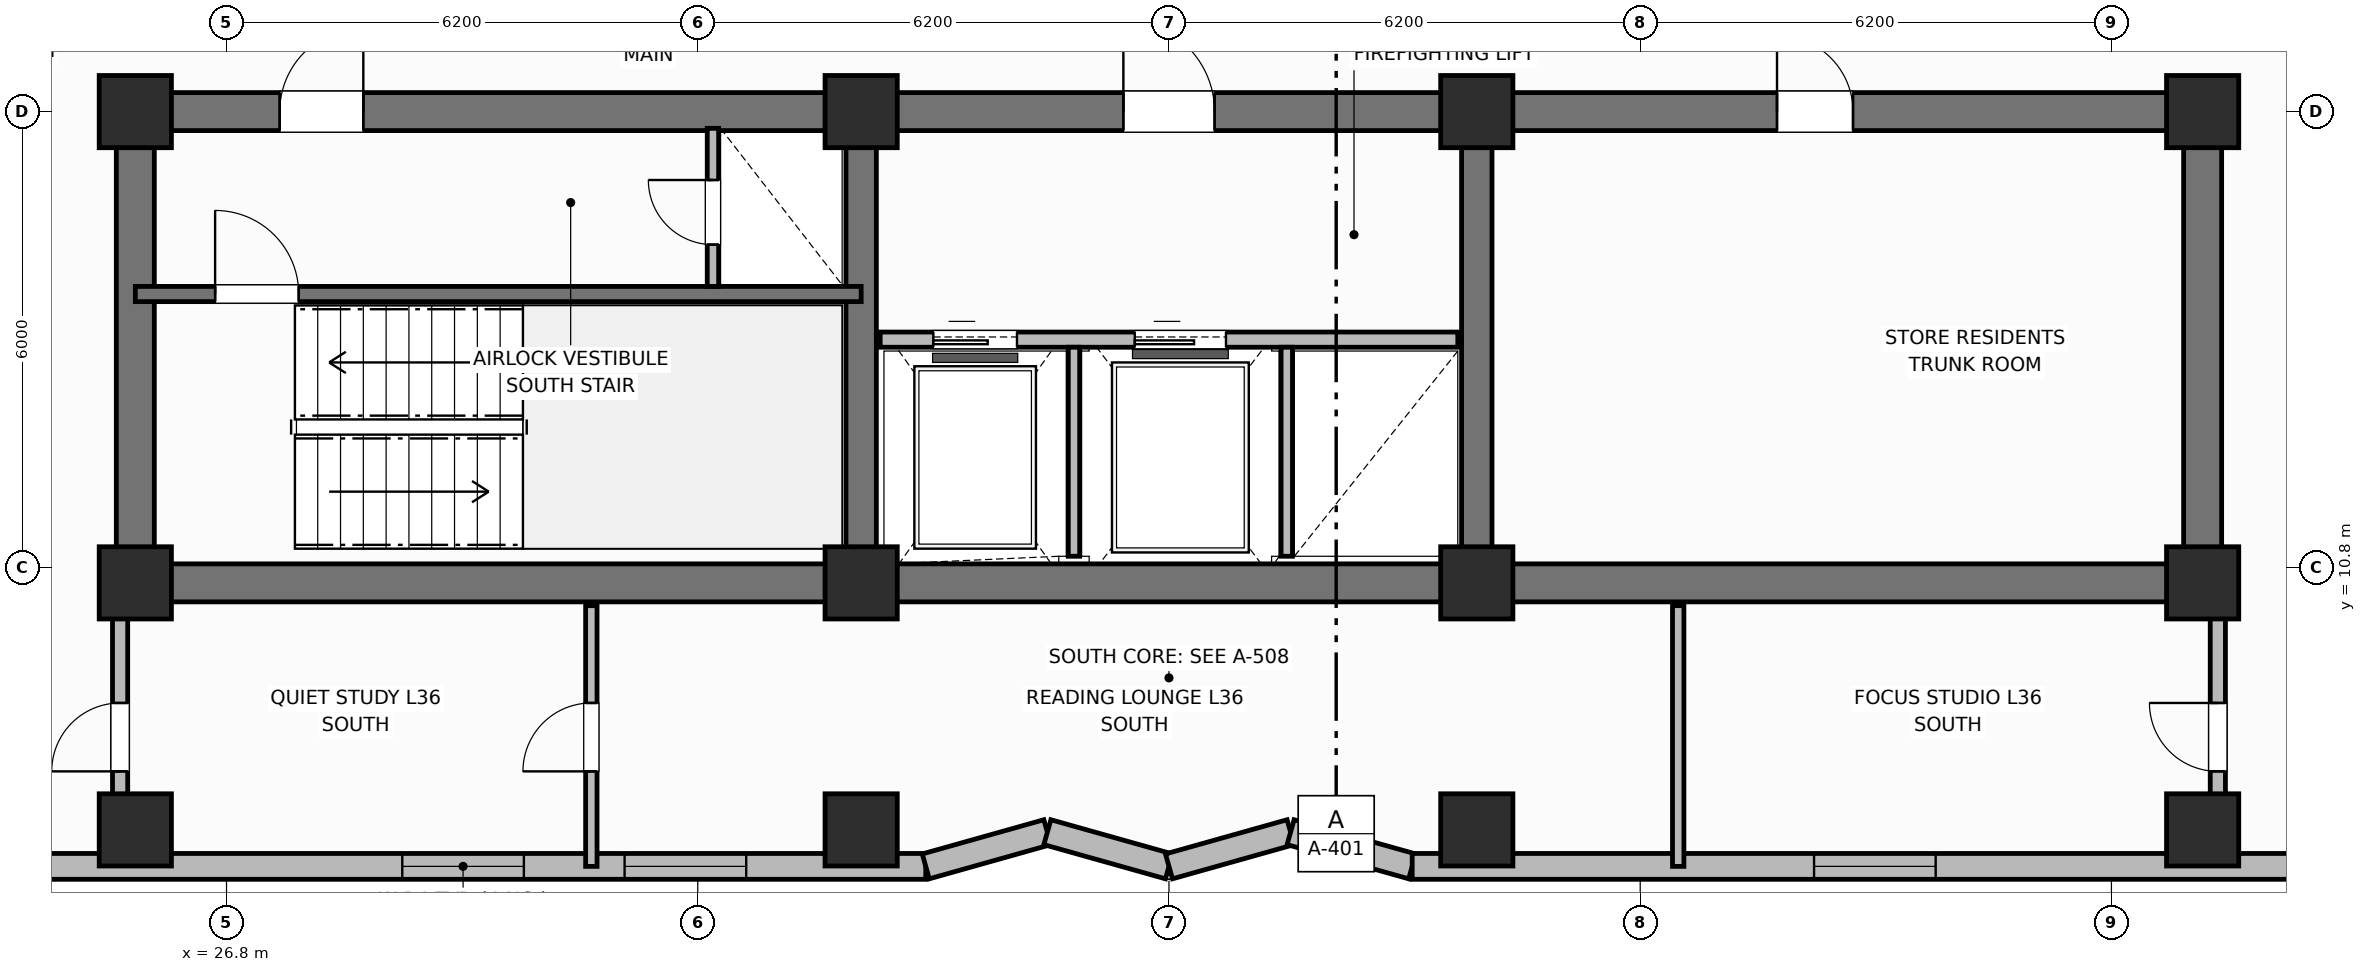
"""IFC4 building model, lengths in metres.
Left out: names, types, materials, properties, quantities, classifications, styles, units other than length and angle.
Written with IfcOpenShell. Run it as: python <this file> out.ifc"""

import sys

from ifc_helpers import new_model, si_unit, direction, frame, frame_2d, origin, origin_2d, place, context, subcontext, project, spatial, rectangle, extrude, element, fill, save


model = new_model("IFC4")
c1 = context("Model", 3, precision=1e-05, world=origin(), true_north=direction((0.0, 1.0)))
c2 = subcontext(c1, "Body", "Model", "MODEL_VIEW")
j1 = project(units=[si_unit("LENGTHUNIT", "METRE"), si_unit("PLANEANGLEUNIT", "RADIAN")], contexts=[c1])
p1 = place(None, origin())
s1 = spatial("IfcSite", under=j1, at=p1, CompositionType="ELEMENT")
p2 = place(p1, origin())
s2 = spatial("IfcBuilding", under=s1, at=p2, CompositionType="ELEMENT")
p3 = place(p2, frame((0.0, 0.0, 147.8)))
s3 = spatial("IfcBuildingStorey", under=s2, at=p3, CompositionType="ELEMENT", Elevation=147.8)
p4 = place(p3, frame((52.8, 10.6, 0.0), z_axis=(0.0, 0.0, 1.0), x_axis=(-1.0, 0.0, 0.0)))
e1 = element("IfcWall", 1, at=p4, inside=s3, PredefinedType="SHEAR", context=c2, shape_type="SweptSolid", body=[
    extrude(rectangle(XDim=27.2, YDim=0.5, at=frame_2d((13.6, 0.0))), origin(), (0.0, 0.0, 1.0), 3.7),
])
for number, where, z_axis, x_axis in (
    (2, (25.6, 10.85, 0.0), (0.0, 0.0, 1.0), (0.0, 1.0, 0.0)),
    (3, (52.8, 10.85, 0.0), (0.0, 0.0, 1.0), (0.0, 1.0, 0.0)),
):
    element("IfcWall", number, at=place(p3, frame(where, z_axis=z_axis, x_axis=x_axis)), inside=s3, PredefinedType="SHEAR", context=c2, shape_type="SweptSolid", body=[
        extrude(rectangle(XDim=5.7, YDim=0.5, at=frame_2d((2.85, 0.0))), origin(), (0.0, 0.0, 1.0), 3.7),
    ])
p5 = place(p3, frame((25.6, 16.8, 0.0), z_axis=(0.0, 0.0, 1.0), x_axis=(1.0, 0.0, 0.0)))
e4 = element("IfcWall", 4, at=p5, inside=s3, PredefinedType="SHEAR", context=c2, shape_type="SweptSolid", body=[
    extrude(rectangle(XDim=27.2, YDim=0.5, at=frame_2d((13.6, 0.0))), origin(), (0.0, 0.0, 1.0), 3.7),
])
p6 = place(p5, frame((1.9, 0.0, 0.0)))
e5 = element("IfcOpeningElement", 5, at=p6, cuts=e4, PredefinedType="OPENING", context=c2, shape_type="SweptSolid", body=[
    extrude(rectangle(XDim=1.1, YDim=2.15, at=frame_2d((0.55, 1.075))), frame((0.0, 0.26, 0.0), z_axis=(0.0, -1.0, 0.0), x_axis=(1.0, 0.0, 0.0)), (0.0, 0.0, 1.0), 0.52),
])
p7 = place(p5, frame((13.0, 0.0, 0.0)))
e6 = element("IfcOpeningElement", 6, at=p7, cuts=e4, PredefinedType="OPENING", context=c2, shape_type="SweptSolid", body=[
    extrude(rectangle(XDim=1.2, YDim=2.15, at=frame_2d((0.6, 1.075))), frame((0.0, 0.26, 0.0), z_axis=(0.0, -1.0, 0.0), x_axis=(1.0, 0.0, 0.0)), (0.0, 0.0, 1.0), 0.52),
])
p8 = place(p5, frame((21.6, 0.0, 0.0)))
e7 = element("IfcOpeningElement", 7, at=p8, cuts=e4, PredefinedType="OPENING", context=c2, shape_type="SweptSolid", body=[
    extrude(rectangle(XDim=1.0, YDim=2.15, at=frame_2d((0.5, 1.075))), frame((0.0, 0.26, 0.0), z_axis=(0.0, -1.0, 0.0), x_axis=(1.0, 0.0, 0.0)), (0.0, 0.0, 1.0), 0.52),
])
for number, where, z_axis, x_axis in (
    (8, (35.15, 10.85, 0.0), (0.0, 0.0, 1.0), (0.0, 1.0, 0.0)),
    (9, (43.25, 10.85, 0.0), (0.0, 0.0, 1.0), (0.0, 1.0, 0.0)),
):
    element("IfcWall", number, at=place(p3, frame(where, z_axis=z_axis, x_axis=x_axis)), inside=s3, PredefinedType="SHEAR", context=c2, shape_type="SweptSolid", body=[
        extrude(rectangle(XDim=5.7, YDim=0.4, at=frame_2d((2.85, 0.0))), origin(), (0.0, 0.0, 1.0), 3.7),
    ])
for number, where, z_axis, x_axis in (
    (10, (25.6, 10.6, 0.0), (0.0, 0.0, 1.0), (1.0, 0.0, 0.0)),
    (11, (25.6, 16.8, 0.0), (0.0, 0.0, 1.0), (1.0, 0.0, 0.0)),
    (12, (35.15, 10.6, 0.0), (0.0, 0.0, 1.0), (1.0, 0.0, 0.0)),
    (13, (35.15, 16.8, 0.0), (0.0, 0.0, 1.0), (1.0, 0.0, 0.0)),
    (14, (43.25, 10.6, 0.0), (0.0, 0.0, 1.0), (1.0, 0.0, 0.0)),
    (15, (43.25, 16.8, 0.0), (0.0, 0.0, 1.0), (1.0, 0.0, 0.0)),
    (16, (52.8, 10.6, 0.0), (0.0, 0.0, 1.0), (1.0, 0.0, 0.0)),
    (17, (52.8, 16.8, 0.0), (0.0, 0.0, 1.0), (1.0, 0.0, 0.0)),
    (18, (25.6, 7.35, 0.0), (0.0, 0.0, 1.0), (1.0, 0.0, 0.0)),
    (19, (35.15, 7.35, 0.0), (0.0, 0.0, 1.0), (1.0, 0.0, 0.0)),
    (20, (43.25, 7.35, 0.0), (0.0, 0.0, 1.0), (1.0, 0.0, 0.0)),
    (21, (52.8, 7.35, 0.0), (0.0, 0.0, 1.0), (1.0, 0.0, 0.0)),
):
    element("IfcColumn", number, at=place(p3, frame(where, z_axis=z_axis, x_axis=x_axis)), inside=s3, PredefinedType="COLUMN", context=c2, shape_type="SweptSolid", body=[
        extrude(rectangle(XDim=0.95, YDim=0.95, at=origin_2d()), origin(), (0.0, 0.0, 1.0), 3.7),
    ])
p9 = place(p3, frame((20.2, 6.87, 0.0), z_axis=(0.0, 0.0, 1.0), x_axis=(1.0, 0.0, 0.0)))
e22 = element("IfcWall", 22, at=p9, inside=s3, PredefinedType="SOLIDWALL", context=c2, shape_type="SweptSolid", body=[
    extrude(rectangle(XDim=15.8, YDim=0.34, at=frame_2d((7.9, 0.0))), origin(), (0.0, 0.0, 1.0), 2.72),
])
p10 = place(p9, frame((8.913, 0.0, 0.7)))
e23 = element("IfcOpeningElement", 23, at=p10, cuts=e22, PredefinedType="OPENING", context=c2, shape_type="SweptSolid", body=[
    extrude(rectangle(XDim=1.6, YDim=1.9, at=frame_2d((0.8, 0.95))), frame((0.0, 0.18, 0.0), z_axis=(0.0, -1.0, 0.0), x_axis=(1.0, 0.0, 0.0)), (0.0, 0.0, 1.0), 0.36),
])
p11 = place(p9, frame((11.837, 0.0, 0.7)))
e24 = element("IfcOpeningElement", 24, at=p11, cuts=e22, PredefinedType="OPENING", context=c2, shape_type="SweptSolid", body=[
    extrude(rectangle(XDim=1.6, YDim=1.9, at=frame_2d((0.8, 0.95))), frame((0.0, 0.18, 0.0), z_axis=(0.0, -1.0, 0.0), x_axis=(1.0, 0.0, 0.0)), (0.0, 0.0, 1.0), 0.36),
])
p12 = place(p3, frame((36.0, 6.87, 0.0), z_axis=(0.0, 0.0, 1.0), x_axis=(0.962662902433, 0.270703040766, 0.0)))
e25 = element("IfcWall", 25, at=p12, inside=s3, PredefinedType="SOLIDWALL", context=c2, shape_type="SweptSolid", body=[
    extrude(rectangle(XDim=1.662, YDim=0.34, at=frame_2d((0.831, 0.0))), origin(), (0.0, 0.0, 1.0), 2.72),
])
p13 = place(p3, frame((37.6, 7.32, 0.0), z_axis=(0.0, 0.0, 1.0), x_axis=(0.962652136636, -0.270741322725, 0.0)))
e26 = element("IfcWall", 26, at=p13, inside=s3, PredefinedType="SOLIDWALL", context=c2, shape_type="SweptSolid", body=[
    extrude(rectangle(XDim=1.662, YDim=0.34, at=frame_2d((0.831, 0.0))), origin(), (0.0, 0.0, 1.0), 2.72),
])
p14 = place(p3, frame((39.2, 6.87, 0.0), z_axis=(0.0, 0.0, 1.0), x_axis=(0.962662902433, 0.270703040766, 0.0)))
e27 = element("IfcWall", 27, at=p14, inside=s3, PredefinedType="SOLIDWALL", context=c2, shape_type="SweptSolid", body=[
    extrude(rectangle(XDim=1.662, YDim=0.34, at=frame_2d((0.831, 0.0))), origin(), (0.0, 0.0, 1.0), 2.72),
])
p15 = place(p3, frame((40.8, 7.32, 0.0), z_axis=(0.0, 0.0, 1.0), x_axis=(0.962652136636, -0.270741322725, 0.0)))
e28 = element("IfcWall", 28, at=p15, inside=s3, PredefinedType="SOLIDWALL", context=c2, shape_type="SweptSolid", body=[
    extrude(rectangle(XDim=1.662, YDim=0.34, at=frame_2d((0.831, 0.0))), origin(), (0.0, 0.0, 1.0), 2.72),
])
p16 = place(p3, frame((42.4, 6.87, 0.0), z_axis=(0.0, 0.0, 1.0), x_axis=(1.0, 0.0, 0.0)))
e29 = element("IfcWall", 29, at=p16, inside=s3, PredefinedType="SOLIDWALL", context=c2, shape_type="SweptSolid", body=[
    extrude(rectangle(XDim=15.8, YDim=0.34, at=frame_2d((7.9, 0.0))), origin(), (0.0, 0.0, 1.0), 2.72),
])
p17 = place(p16, frame((5.288, 0.0, 0.7)))
e30 = element("IfcOpeningElement", 30, at=p17, cuts=e29, PredefinedType="OPENING", context=c2, shape_type="SweptSolid", body=[
    extrude(rectangle(XDim=1.6, YDim=1.9, at=frame_2d((0.8, 0.95))), frame((0.0, 0.18, 0.0), z_axis=(0.0, -1.0, 0.0), x_axis=(1.0, 0.0, 0.0)), (0.0, 0.0, 1.0), 0.36),
])
p18 = place(p3, frame((25.6, 14.4, 0.0), z_axis=(0.0, 0.0, 1.0), x_axis=(1.0, 0.0, 0.0)))
e31 = element("IfcWall", 31, at=p18, inside=s3, PredefinedType="SHEAR", context=c2, shape_type="SweptSolid", body=[
    extrude(rectangle(XDim=9.55, YDim=0.2, at=frame_2d((4.775, 0.0))), origin(), (0.0, 0.0, 1.0), 3.7),
])
p19 = place(p18, frame((1.05, 0.0, 0.0)))
e32 = element("IfcOpeningElement", 32, at=p19, cuts=e31, PredefinedType="OPENING", context=c2, shape_type="SweptSolid", body=[
    extrude(rectangle(XDim=1.1, YDim=2.15, at=frame_2d((0.55, 1.075))), frame((0.0, 0.11, 0.0), z_axis=(0.0, -1.0, 0.0), x_axis=(1.0, 0.0, 0.0)), (0.0, 0.0, 1.0), 0.22),
])
p20 = place(p3, frame((33.2, 14.5, 0.0), z_axis=(0.0, 0.0, 1.0), x_axis=(0.0, 1.0, 0.0)))
e33 = element("IfcWall", 33, at=p20, inside=s3, PredefinedType="PARTITIONING", context=c2, shape_type="SweptSolid", body=[
    extrude(rectangle(XDim=2.08, YDim=0.15, at=frame_2d((1.04, 0.0))), origin(), (0.0, 0.0, 1.0), 2.55),
])
p21 = place(p20, frame((0.55, 0.0, 0.0)))
e34 = element("IfcOpeningElement", 34, at=p21, cuts=e33, PredefinedType="OPENING", context=c2, shape_type="SweptSolid", body=[
    extrude(rectangle(XDim=0.85, YDim=2.05, at=frame_2d((0.425, 1.025))), frame((0.0, 0.085, 0.0), z_axis=(0.0, -1.0, 0.0), x_axis=(1.0, 0.0, 0.0)), (0.0, 0.0, 1.0), 0.17),
])
p22 = place(p3, frame((35.4, 13.8, 0.0), z_axis=(0.0, 0.0, 1.0), x_axis=(1.0, 0.0, 0.0)))
e35 = element("IfcWall", 35, at=p22, inside=s3, PredefinedType="PARTITIONING", context=c2, shape_type="SweptSolid", body=[
    extrude(rectangle(XDim=7.6, YDim=0.2, at=frame_2d((3.8, 0.0))), origin(), (0.0, 0.0, 1.0), 2.32),
])
p23 = place(p22, frame((0.7, 0.0, 0.0)))
e36 = element("IfcOpeningElement", 36, at=p23, cuts=e35, PredefinedType="OPENING", context=c2, shape_type="SweptSolid", body=[
    extrude(rectangle(XDim=1.1, YDim=2.15, at=frame_2d((0.55, 1.075))), frame((0.0, 0.11, 0.0), z_axis=(0.0, -1.0, 0.0), x_axis=(1.0, 0.0, 0.0)), (0.0, 0.0, 1.0), 0.22),
])
p24 = place(p22, frame((3.35, 0.0, 0.0)))
e37 = element("IfcOpeningElement", 37, at=p24, cuts=e35, PredefinedType="OPENING", context=c2, shape_type="SweptSolid", body=[
    extrude(rectangle(XDim=1.2, YDim=2.15, at=frame_2d((0.6, 1.075))), frame((0.0, 0.11, 0.0), z_axis=(0.0, -1.0, 0.0), x_axis=(1.0, 0.0, 0.0)), (0.0, 0.0, 1.0), 0.22),
])
for number, where, z_axis, x_axis in (
    (38, (37.95, 10.95, 0.0), (0.0, 0.0, 1.0), (0.0, 1.0, 0.0)),
    (39, (40.75, 10.95, 0.0), (0.0, 0.0, 1.0), (0.0, 1.0, 0.0)),
):
    element("IfcWall", number, at=place(p3, frame(where, z_axis=z_axis, x_axis=x_axis)), inside=s3, PredefinedType="PARTITIONING", context=c2, shape_type="SweptSolid", body=[
        extrude(rectangle(XDim=2.75, YDim=0.15, at=frame_2d((1.375, 0.0))), origin(), (0.0, 0.0, 1.0), 2.55),
    ])
p25 = place(p3, frame((31.6, 6.87, 0.0), z_axis=(0.0, 0.0, 1.0), x_axis=(0.0, 1.0, 0.0)))
e40 = element("IfcWall", 40, at=p25, inside=s3, PredefinedType="PARTITIONING", context=c2, shape_type="SweptSolid", body=[
    extrude(rectangle(XDim=3.43, YDim=0.15, at=frame_2d((1.715, 0.0))), origin(), (0.0, 0.0, 1.0), 2.55),
])
p26 = place(p25, frame((1.25, 0.0, 0.0)))
e41 = element("IfcOpeningElement", 41, at=p26, cuts=e40, PredefinedType="OPENING", context=c2, shape_type="SweptSolid", body=[
    extrude(rectangle(XDim=0.9, YDim=2.1, at=frame_2d((0.45, 1.05))), frame((0.0, 0.085, 0.0), z_axis=(0.0, -1.0, 0.0), x_axis=(1.0, 0.0, 0.0)), (0.0, 0.0, 1.0), 0.17),
])
p27 = place(p3, frame((45.9, 6.87, 0.0), z_axis=(0.0, 0.0, 1.0), x_axis=(0.0, 1.0, 0.0)))
e42 = element("IfcWall", 42, at=p27, inside=s3, PredefinedType="PARTITIONING", context=c2, shape_type="SweptSolid", body=[
    extrude(rectangle(XDim=3.43, YDim=0.15, at=frame_2d((1.715, 0.0))), origin(), (0.0, 0.0, 1.0), 2.55),
])
p28 = place(p3, frame((25.4, 7.47, 0.0), z_axis=(0.0, 0.0, 1.0), x_axis=(0.0, 1.0, 0.0)))
e43 = element("IfcWall", 43, at=p28, inside=s3, PredefinedType="PARTITIONING", context=c2, shape_type="SweptSolid", body=[
    extrude(rectangle(XDim=2.83, YDim=0.2, at=frame_2d((1.415, 0.0))), origin(), (0.0, 0.0, 1.0), 2.55),
])
p29 = place(p28, frame((0.65, 0.0, 0.0)))
e44 = element("IfcOpeningElement", 44, at=p29, cuts=e43, PredefinedType="OPENING", context=c2, shape_type="SweptSolid", body=[
    extrude(rectangle(XDim=0.9, YDim=2.1, at=frame_2d((0.45, 1.05))), frame((0.0, 0.11, 0.0), z_axis=(0.0, -1.0, 0.0), x_axis=(1.0, 0.0, 0.0)), (0.0, 0.0, 1.0), 0.22),
])
p30 = place(p3, frame((53.0, 7.47, 0.0), z_axis=(0.0, 0.0, 1.0), x_axis=(0.0, 1.0, 0.0)))
e45 = element("IfcWall", 45, at=p30, inside=s3, PredefinedType="PARTITIONING", context=c2, shape_type="SweptSolid", body=[
    extrude(rectangle(XDim=2.83, YDim=0.2, at=frame_2d((1.415, 0.0))), origin(), (0.0, 0.0, 1.0), 2.55),
])
p31 = place(p30, frame((0.65, 0.0, 0.0)))
e46 = element("IfcOpeningElement", 46, at=p31, cuts=e45, PredefinedType="OPENING", context=c2, shape_type="SweptSolid", body=[
    extrude(rectangle(XDim=0.9, YDim=2.1, at=frame_2d((0.45, 1.05))), frame((0.0, 0.11, 0.0), z_axis=(0.0, -1.0, 0.0), x_axis=(1.0, 0.0, 0.0)), (0.0, 0.0, 1.0), 0.22),
])
p32 = place(p10, origin())
e47 = element("IfcWindow", 47, at=p32, inside=s3, PartitioningType="SINGLE_PANEL", PredefinedType="WINDOW", context=c2, shape_type="SweptSolid", body=[
    extrude(rectangle(XDim=1.6, YDim=1.9, at=frame_2d((0.8, 0.95))), frame((0.0, 0.03, 0.0), z_axis=(0.0, -1.0, 0.0), x_axis=(1.0, 0.0, 0.0)), (0.0, 0.0, 1.0), 0.06),
])
fill(e23, e47)
p33 = place(p11, origin())
e48 = element("IfcWindow", 48, at=p33, inside=s3, PartitioningType="SINGLE_PANEL", PredefinedType="WINDOW", context=c2, shape_type="SweptSolid", body=[
    extrude(rectangle(XDim=1.6, YDim=1.9, at=frame_2d((0.8, 0.95))), frame((0.0, 0.03, 0.0), z_axis=(0.0, -1.0, 0.0), x_axis=(1.0, 0.0, 0.0)), (0.0, 0.0, 1.0), 0.06),
])
fill(e24, e48)
p34 = place(p17, origin())
e49 = element("IfcWindow", 49, at=p34, inside=s3, PartitioningType="SINGLE_PANEL", PredefinedType="WINDOW", context=c2, shape_type="SweptSolid", body=[
    extrude(rectangle(XDim=1.6, YDim=1.9, at=frame_2d((0.8, 0.95))), frame((0.0, 0.03, 0.0), z_axis=(0.0, -1.0, 0.0), x_axis=(1.0, 0.0, 0.0)), (0.0, 0.0, 1.0), 0.06),
])
fill(e30, e49)
p35 = place(p19, origin())
e50 = element("IfcDoor", 50, at=p35, inside=s3, OperationType="SINGLE_SWING_LEFT", PredefinedType="DOOR", context=c2, shape_type="SweptSolid", body=[
    extrude(rectangle(XDim=1.1, YDim=2.15, at=frame_2d((0.55, 1.075))), frame((0.0, 0.025, 0.0), z_axis=(0.0, -1.0, 0.0), x_axis=(1.0, 0.0, 0.0)), (0.0, 0.0, 1.0), 0.05),
])
fill(e32, e50)
p36 = place(p21, origin())
e51 = element("IfcDoor", 51, at=p36, inside=s3, OperationType="SINGLE_SWING_RIGHT", PredefinedType="TRAPDOOR", context=c2, shape_type="SweptSolid", body=[
    extrude(rectangle(XDim=0.85, YDim=2.05, at=frame_2d((0.425, 1.025))), frame((0.0, 0.025, 0.0), z_axis=(0.0, -1.0, 0.0), x_axis=(1.0, 0.0, 0.0)), (0.0, 0.0, 1.0), 0.05),
])
fill(e34, e51)
p37 = place(p23, origin())
e52 = element("IfcDoor", 52, at=p37, inside=s3, OperationType="SLIDING_TO_LEFT", PredefinedType="DOOR", context=c2, shape_type="SweptSolid", body=[
    extrude(rectangle(XDim=1.1, YDim=2.15, at=frame_2d((0.55, 1.075))), frame((0.0, 0.025, 0.0), z_axis=(0.0, -1.0, 0.0), x_axis=(1.0, 0.0, 0.0)), (0.0, 0.0, 1.0), 0.05),
])
fill(e36, e52)
p38 = place(p24, origin())
e53 = element("IfcDoor", 53, at=p38, inside=s3, OperationType="SLIDING_TO_LEFT", PredefinedType="DOOR", context=c2, shape_type="SweptSolid", body=[
    extrude(rectangle(XDim=1.2, YDim=2.15, at=frame_2d((0.6, 1.075))), frame((0.0, 0.025, 0.0), z_axis=(0.0, -1.0, 0.0), x_axis=(1.0, 0.0, 0.0)), (0.0, 0.0, 1.0), 0.05),
])
fill(e37, e53)
p39 = place(p26, origin())
e54 = element("IfcDoor", 54, at=p39, inside=s3, OperationType="SINGLE_SWING_LEFT", PredefinedType="DOOR", context=c2, shape_type="SweptSolid", body=[
    extrude(rectangle(XDim=0.9, YDim=2.1, at=frame_2d((0.45, 1.05))), frame((0.0, 0.025, 0.0), z_axis=(0.0, -1.0, 0.0), x_axis=(1.0, 0.0, 0.0)), (0.0, 0.0, 1.0), 0.05),
])
fill(e41, e54)
p40 = place(p29, origin())
e55 = element("IfcDoor", 55, at=p40, inside=s3, OperationType="SINGLE_SWING_LEFT", PredefinedType="DOOR", context=c2, shape_type="SweptSolid", body=[
    extrude(rectangle(XDim=0.9, YDim=2.1, at=frame_2d((0.45, 1.05))), frame((0.0, 0.025, 0.0), z_axis=(0.0, -1.0, 0.0), x_axis=(1.0, 0.0, 0.0)), (0.0, 0.0, 1.0), 0.05),
])
fill(e44, e55)
p41 = place(p31, origin())
e56 = element("IfcDoor", 56, at=p41, inside=s3, OperationType="SINGLE_SWING_RIGHT", PredefinedType="DOOR", context=c2, shape_type="SweptSolid", body=[
    extrude(rectangle(XDim=0.9, YDim=2.1, at=frame_2d((0.45, 1.05))), frame((0.0, 0.025, 0.0), z_axis=(0.0, -1.0, 0.0), x_axis=(1.0, 0.0, 0.0)), (0.0, 0.0, 1.0), 0.05),
])
fill(e46, e56)
p42 = place(p6, origin())
e57 = element("IfcDoor", 57, at=p42, inside=s3, OperationType="SINGLE_SWING_RIGHT", PredefinedType="DOOR", context=c2, shape_type="SweptSolid", body=[
    extrude(rectangle(XDim=1.1, YDim=2.15, at=frame_2d((0.55, 1.075))), frame((0.0, 0.025, 0.0), z_axis=(0.0, -1.0, 0.0), x_axis=(1.0, 0.0, 0.0)), (0.0, 0.0, 1.0), 0.05),
])
fill(e5, e57)
p43 = place(p7, origin())
e58 = element("IfcDoor", 58, at=p43, inside=s3, OperationType="SINGLE_SWING_LEFT", PredefinedType="DOOR", context=c2, shape_type="SweptSolid", body=[
    extrude(rectangle(XDim=1.2, YDim=2.15, at=frame_2d((0.6, 1.075))), frame((0.0, 0.025, 0.0), z_axis=(0.0, -1.0, 0.0), x_axis=(1.0, 0.0, 0.0)), (0.0, 0.0, 1.0), 0.05),
])
fill(e6, e58)
p44 = place(p8, origin())
e59 = element("IfcDoor", 59, at=p44, inside=s3, OperationType="SINGLE_SWING_LEFT", PredefinedType="DOOR", context=c2, shape_type="SweptSolid", body=[
    extrude(rectangle(XDim=1.0, YDim=2.15, at=frame_2d((0.5, 1.075))), frame((0.0, 0.025, 0.0), z_axis=(0.0, -1.0, 0.0), x_axis=(1.0, 0.0, 0.0)), (0.0, 0.0, 1.0), 0.05),
])
fill(e7, e59)
save(model, sys.argv[1])
